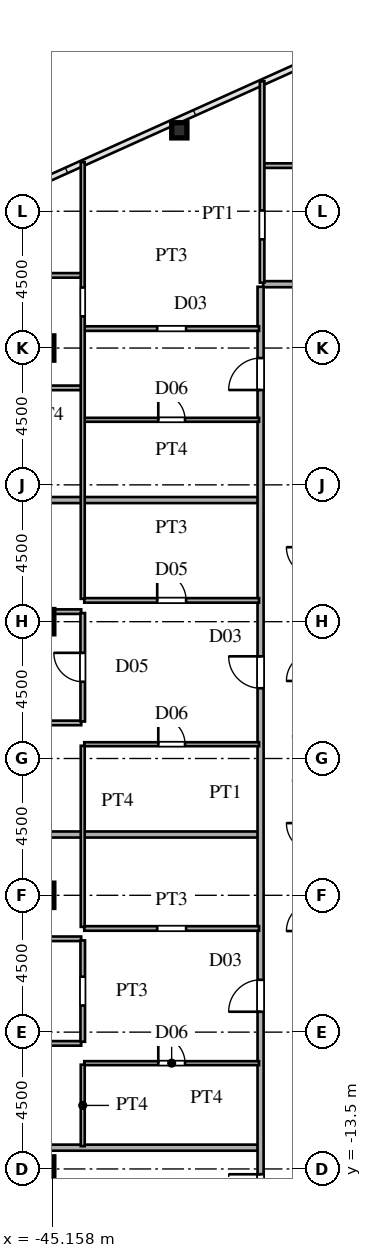
"""IFC4 building model, lengths in metres.
Left out: names, types, materials, properties, quantities, classifications, styles, units other than length and angle.
Written with IfcOpenShell. Run it as: python <this file> out.ifc"""

import sys

from ifc_helpers import new_model, si_unit, direction, frame, frame_2d, origin, origin_2d, place, context, subcontext, project, spatial, rectangle, hollow_rectangle, i_section, extrude, source, transform, mapped, element, fill, save


model = new_model("IFC4")
c1 = context("Model", 3, precision=1e-05, world=origin(), true_north=direction((0.0, 1.0)))
c2 = subcontext(c1, "Body", "Model", "MODEL_VIEW")
j1 = project(units=[si_unit("LENGTHUNIT", "METRE"), si_unit("PLANEANGLEUNIT", "RADIAN")], contexts=[c1])
p1 = place(None, origin())
s1 = spatial("IfcSite", under=j1, at=p1, CompositionType="ELEMENT")
p2 = place(p1, origin())
s2 = spatial("IfcBuilding", under=s1, at=p2, CompositionType="ELEMENT")
p3 = place(p2, frame((0.0, 0.0, 92.4)))
s3 = spatial("IfcBuildingStorey", under=s2, at=p3, CompositionType="ELEMENT", Elevation=92.4)
m1 = source(origin(), c2, "Body", "SweptSolid", [
    extrude(i_section(OverallWidth=0.8, OverallDepth=0.8, WebThickness=0.032, FlangeThickness=0.05, at=origin_2d()), origin(), (0.0, 0.0, 1.0), 3.6),
])
for number, where, z_axis, x_axis in (
    (1, (-45.5, -13.5, 0.0), (0.0, 0.0, 1.0), (1.0, 0.0, 0.0)),
    (2, (-45.5, -4.5, 0.0), (0.0, 0.0, 1.0), (1.0, 0.0, 0.0)),
    (3, (-45.5, 4.5, 0.0), (0.0, 0.0, 1.0), (1.0, 0.0, 0.0)),
    (4, (-45.5, 13.5, 0.0), (0.0, 0.0, 1.0), (1.0, 0.0, 0.0)),
):
    element("IfcColumn", number, at=place(p3, frame(where, z_axis=z_axis, x_axis=x_axis)), inside=s3, PredefinedType="COLUMN", context=c2, shape_type="MappedRepresentation", body=[
        mapped(m1, transform((0.0, 0.0, 0.0), scale=1.0)),
    ])
m2 = source(origin(), c2, "Body", "SweptSolid", [
    extrude(hollow_rectangle(XDim=0.5, YDim=0.5, WallThickness=0.02, at=origin_2d()), origin(), (0.0, 0.0, 1.0), 3.6),
])
p4 = place(p3, frame((-40.973, 20.661, 0.0), z_axis=(0.0, 0.0, 1.0), x_axis=(1.0, 0.0, 0.0)))
e5 = element("IfcColumn", 5, at=p4, inside=s3, PredefinedType="COLUMN", context=c2, shape_type="MappedRepresentation", body=[
    mapped(m2, transform((0.0, 0.0, 0.0), scale=1.0)),
])
p5 = place(p3, frame((-59.234, -12.8, 0.0), z_axis=(0.0, 0.0, 1.0), x_axis=(1.0, 0.0, 0.0)))
e6 = element("IfcWall", 6, at=p5, inside=s3, PredefinedType="PARTITIONING", context=c2, shape_type="SweptSolid", body=[
    extrude(rectangle(XDim=20.854, YDim=0.2, at=frame_2d((10.427, 0.0))), origin(), (0.0, 0.0, 1.0), 3.38),
])
p6 = place(p3, frame((-44.1, -10.02, 0.0), z_axis=(0.0, 0.0, 1.0), x_axis=(1.0, 0.0, 0.0)))
e7 = element("IfcWall", 7, at=p6, inside=s3, PredefinedType="PARTITIONING", context=c2, shape_type="SweptSolid", body=[
    extrude(rectangle(XDim=5.75, YDim=0.13, at=frame_2d((2.875, 0.0))), origin(), (0.0, 0.0, 1.0), 3.38),
])
p7 = place(p6, frame((2.435, 0.0, 0.0)))
e8 = element("IfcOpeningElement", 8, at=p7, cuts=e7, PredefinedType="OPENING", context=c2, shape_type="SweptSolid", body=[
    extrude(rectangle(XDim=0.88, YDim=2.1, at=frame_2d((0.44, 1.05))), frame((0.0, 0.075, 0.0), z_axis=(0.0, -1.0, 0.0), x_axis=(1.0, 0.0, 0.0)), (0.0, 0.0, 1.0), 0.15),
])
p8 = place(p3, frame((-66.887, -9.37, 0.0), z_axis=(0.0, 0.0, 1.0), x_axis=(1.0, 0.0, 0.0)))
e9 = element("IfcWall", 9, at=p8, inside=s3, PredefinedType="PARTITIONING", context=c2, shape_type="SweptSolid", body=[
    extrude(rectangle(XDim=22.687, YDim=0.15, at=frame_2d((11.344, 0.0))), origin(), (0.0, 0.0, 1.0), 3.38),
])
p9 = place(p8, frame((17.087, 0.0, 0.0)))
e10 = element("IfcOpeningElement", 10, at=p9, cuts=e9, PredefinedType="OPENING", context=c2, shape_type="SweptSolid", body=[
    extrude(rectangle(XDim=0.95, YDim=2.15, at=frame_2d((0.475, 1.075))), frame((0.0, 0.085, 0.0), z_axis=(0.0, -1.0, 0.0), x_axis=(1.0, 0.0, 0.0)), (0.0, 0.0, 1.0), 0.17),
])
p10 = place(p3, frame((-71.035, -5.93, 0.0), z_axis=(0.0, 0.0, 1.0), x_axis=(1.0, 0.0, 0.0)))
e11 = element("IfcWall", 11, at=p10, inside=s3, PredefinedType="PARTITIONING", context=c2, shape_type="SweptSolid", body=[
    extrude(rectangle(XDim=26.835, YDim=0.15, at=frame_2d((13.417, 0.0))), origin(), (0.0, 0.0, 1.0), 3.38),
])
p11 = place(p10, frame((21.235, 0.0, 0.0)))
e12 = element("IfcOpeningElement", 12, at=p11, cuts=e11, PredefinedType="OPENING", context=c2, shape_type="SweptSolid", body=[
    extrude(rectangle(XDim=0.95, YDim=2.15, at=frame_2d((0.475, 1.075))), frame((0.0, 0.085, 0.0), z_axis=(0.0, -1.0, 0.0), x_axis=(1.0, 0.0, 0.0)), (0.0, 0.0, 1.0), 0.17),
])
p12 = place(p3, frame((-44.1, -5.59, 0.0), z_axis=(0.0, 0.0, 1.0), x_axis=(1.0, 0.0, 0.0)))
e13 = element("IfcWall", 13, at=p12, inside=s3, PredefinedType="PARTITIONING", context=c2, shape_type="SweptSolid", body=[
    extrude(rectangle(XDim=5.75, YDim=0.15, at=frame_2d((2.875, 0.0))), origin(), (0.0, 0.0, 1.0), 3.38),
])
p13 = place(p12, frame((2.4, 0.0, 0.0)))
e14 = element("IfcOpeningElement", 14, at=p13, cuts=e13, PredefinedType="OPENING", context=c2, shape_type="SweptSolid", body=[
    extrude(rectangle(XDim=0.95, YDim=2.15, at=frame_2d((0.475, 1.075))), frame((0.0, 0.085, 0.0), z_axis=(0.0, -1.0, 0.0), x_axis=(1.0, 0.0, 0.0)), (0.0, 0.0, 1.0), 0.17),
])
p14 = place(p3, frame((-71.005, -2.5, 0.0), z_axis=(0.0, 0.0, 1.0), x_axis=(1.0, 0.0, 0.0)))
e15 = element("IfcWall", 15, at=p14, inside=s3, PredefinedType="PARTITIONING", context=c2, shape_type="SweptSolid", body=[
    extrude(rectangle(XDim=32.625, YDim=0.2, at=frame_2d((16.312, 0.0))), origin(), (0.0, 0.0, 1.0), 3.38),
])
p15 = place(p3, frame((-44.1, 0.47, 0.0), z_axis=(0.0, 0.0, 1.0), x_axis=(1.0, 0.0, 0.0)))
e16 = element("IfcWall", 16, at=p15, inside=s3, PredefinedType="PARTITIONING", context=c2, shape_type="SweptSolid", body=[
    extrude(rectangle(XDim=5.75, YDim=0.13, at=frame_2d((2.875, 0.0))), origin(), (0.0, 0.0, 1.0), 3.38),
])
p16 = place(p15, frame((2.435, 0.0, 0.0)))
e17 = element("IfcOpeningElement", 17, at=p16, cuts=e16, PredefinedType="OPENING", context=c2, shape_type="SweptSolid", body=[
    extrude(rectangle(XDim=0.88, YDim=2.1, at=frame_2d((0.44, 1.05))), frame((0.0, 0.075, 0.0), z_axis=(0.0, -1.0, 0.0), x_axis=(1.0, 0.0, 0.0)), (0.0, 0.0, 1.0), 0.15),
])
p17 = place(p3, frame((-71.035, 1.17, 0.0), z_axis=(0.0, 0.0, 1.0), x_axis=(1.0, 0.0, 0.0)))
e18 = element("IfcWall", 18, at=p17, inside=s3, PredefinedType="PARTITIONING", context=c2, shape_type="SweptSolid", body=[
    extrude(rectangle(XDim=26.835, YDim=0.15, at=frame_2d((13.417, 0.0))), origin(), (0.0, 0.0, 1.0), 3.38),
])
p18 = place(p17, frame((21.235, 0.0, 0.0)))
e19 = element("IfcOpeningElement", 19, at=p18, cuts=e18, PredefinedType="OPENING", context=c2, shape_type="SweptSolid", body=[
    extrude(rectangle(XDim=0.95, YDim=2.15, at=frame_2d((0.475, 1.075))), frame((0.0, 0.085, 0.0), z_axis=(0.0, -1.0, 0.0), x_axis=(1.0, 0.0, 0.0)), (0.0, 0.0, 1.0), 0.17),
])
p19 = place(p17, frame((13.21, 0.0, 0.0)))
e20 = element("IfcOpeningElement", 20, at=p19, cuts=e18, PredefinedType="OPENING", context=c2, shape_type="SweptSolid", body=[
    extrude(rectangle(XDim=0.95, YDim=2.15, at=frame_2d((0.475, 1.075))), frame((0.0, 0.085, 0.0), z_axis=(0.0, -1.0, 0.0), x_axis=(1.0, 0.0, 0.0)), (0.0, 0.0, 1.0), 0.17),
])
p20 = place(p3, frame((-71.035, 4.83, 0.0), z_axis=(0.0, 0.0, 1.0), x_axis=(1.0, 0.0, 0.0)))
e21 = element("IfcWall", 21, at=p20, inside=s3, PredefinedType="PARTITIONING", context=c2, shape_type="SweptSolid", body=[
    extrude(rectangle(XDim=26.835, YDim=0.15, at=frame_2d((13.417, 0.0))), origin(), (0.0, 0.0, 1.0), 3.38),
])
p21 = place(p20, frame((21.235, 0.0, 0.0)))
e22 = element("IfcOpeningElement", 22, at=p21, cuts=e21, PredefinedType="OPENING", context=c2, shape_type="SweptSolid", body=[
    extrude(rectangle(XDim=0.95, YDim=2.15, at=frame_2d((0.475, 1.075))), frame((0.0, 0.085, 0.0), z_axis=(0.0, -1.0, 0.0), x_axis=(1.0, 0.0, 0.0)), (0.0, 0.0, 1.0), 0.17),
])
p22 = place(p20, frame((13.21, 0.0, 0.0)))
e23 = element("IfcOpeningElement", 23, at=p22, cuts=e21, PredefinedType="OPENING", context=c2, shape_type="SweptSolid", body=[
    extrude(rectangle(XDim=0.95, YDim=2.15, at=frame_2d((0.475, 1.075))), frame((0.0, 0.085, 0.0), z_axis=(0.0, -1.0, 0.0), x_axis=(1.0, 0.0, 0.0)), (0.0, 0.0, 1.0), 0.17),
])
p23 = place(p3, frame((-44.1, 5.2, 0.0), z_axis=(0.0, 0.0, 1.0), x_axis=(1.0, 0.0, 0.0)))
e24 = element("IfcWall", 24, at=p23, inside=s3, PredefinedType="PARTITIONING", context=c2, shape_type="SweptSolid", body=[
    extrude(rectangle(XDim=5.75, YDim=0.15, at=frame_2d((2.875, 0.0))), origin(), (0.0, 0.0, 1.0), 3.38),
])
p24 = place(p23, frame((2.4, 0.0, 0.0)))
e25 = element("IfcOpeningElement", 25, at=p24, cuts=e24, PredefinedType="OPENING", context=c2, shape_type="SweptSolid", body=[
    extrude(rectangle(XDim=0.95, YDim=2.15, at=frame_2d((0.475, 1.075))), frame((0.0, 0.085, 0.0), z_axis=(0.0, -1.0, 0.0), x_axis=(1.0, 0.0, 0.0)), (0.0, 0.0, 1.0), 0.17),
])
p25 = place(p3, frame((-68.79, 8.5, 0.0), z_axis=(0.0, 0.0, 1.0), x_axis=(1.0, 0.0, 0.0)))
e26 = element("IfcWall", 26, at=p25, inside=s3, PredefinedType="PARTITIONING", context=c2, shape_type="SweptSolid", body=[
    extrude(rectangle(XDim=30.41, YDim=0.2, at=frame_2d((15.205, 0.0))), origin(), (0.0, 0.0, 1.0), 3.38),
])
p26 = place(p3, frame((-44.1, 11.14, 0.0), z_axis=(0.0, 0.0, 1.0), x_axis=(1.0, 0.0, 0.0)))
e27 = element("IfcWall", 27, at=p26, inside=s3, PredefinedType="PARTITIONING", context=c2, shape_type="SweptSolid", body=[
    extrude(rectangle(XDim=5.75, YDim=0.13, at=frame_2d((2.875, 0.0))), origin(), (0.0, 0.0, 1.0), 3.38),
])
p27 = place(p26, frame((2.435, 0.0, 0.0)))
e28 = element("IfcOpeningElement", 28, at=p27, cuts=e27, PredefinedType="OPENING", context=c2, shape_type="SweptSolid", body=[
    extrude(rectangle(XDim=0.88, YDim=2.1, at=frame_2d((0.44, 1.05))), frame((0.0, 0.075, 0.0), z_axis=(0.0, -1.0, 0.0), x_axis=(1.0, 0.0, 0.0)), (0.0, 0.0, 1.0), 0.15),
])
p28 = place(p3, frame((-60.603, 12.19, 0.0), z_axis=(0.0, 0.0, 1.0), x_axis=(1.0, 0.0, 0.0)))
e29 = element("IfcWall", 29, at=p28, inside=s3, PredefinedType="PARTITIONING", context=c2, shape_type="SweptSolid", body=[
    extrude(rectangle(XDim=16.403, YDim=0.15, at=frame_2d((8.202, 0.0))), origin(), (0.0, 0.0, 1.0), 3.38),
])
p29 = place(p28, frame((10.803, 0.0, 0.0)))
e30 = element("IfcOpeningElement", 30, at=p29, cuts=e29, PredefinedType="OPENING", context=c2, shape_type="SweptSolid", body=[
    extrude(rectangle(XDim=0.95, YDim=2.15, at=frame_2d((0.475, 1.075))), frame((0.0, 0.085, 0.0), z_axis=(0.0, -1.0, 0.0), x_axis=(1.0, 0.0, 0.0)), (0.0, 0.0, 1.0), 0.17),
])
p30 = place(p28, frame((2.594, 0.0, 0.0)))
e31 = element("IfcOpeningElement", 31, at=p30, cuts=e29, PredefinedType="OPENING", context=c2, shape_type="SweptSolid", body=[
    extrude(rectangle(XDim=0.95, YDim=2.15, at=frame_2d((0.475, 1.075))), frame((0.0, 0.085, 0.0), z_axis=(0.0, -1.0, 0.0), x_axis=(1.0, 0.0, 0.0)), (0.0, 0.0, 1.0), 0.17),
])
p31 = place(p3, frame((-44.1, 14.14, 0.0), z_axis=(0.0, 0.0, 1.0), x_axis=(1.0, 0.0, 0.0)))
e32 = element("IfcWall", 32, at=p31, inside=s3, PredefinedType="PARTITIONING", context=c2, shape_type="SweptSolid", body=[
    extrude(rectangle(XDim=5.75, YDim=0.15, at=frame_2d((2.875, 0.0))), origin(), (0.0, 0.0, 1.0), 3.38),
])
p32 = place(p31, frame((2.4, 0.0, 0.0)))
e33 = element("IfcOpeningElement", 33, at=p32, cuts=e32, PredefinedType="OPENING", context=c2, shape_type="SweptSolid", body=[
    extrude(rectangle(XDim=0.95, YDim=2.15, at=frame_2d((0.475, 1.075))), frame((0.0, 0.085, 0.0), z_axis=(0.0, -1.0, 0.0), x_axis=(1.0, 0.0, 0.0)), (0.0, 0.0, 1.0), 0.17),
])
p33 = place(p3, frame((-38.215, 15.6, 0.0), z_axis=(0.0, 0.0, 1.0), x_axis=(1.0, 0.0, 0.0)))
e34 = element("IfcWall", 34, at=p33, inside=s3, PredefinedType="PARTITIONING", context=c2, shape_type="SweptSolid", body=[
    extrude(rectangle(XDim=1.63, YDim=0.2, at=frame_2d((0.815, 0.0))), origin(), (0.0, 0.0, 1.0), 3.38),
])
p34 = place(p3, frame((-52.394, 15.89, 0.0), z_axis=(0.0, 0.0, 1.0), x_axis=(1.0, 0.0, 0.0)))
e35 = element("IfcWall", 35, at=p34, inside=s3, PredefinedType="PARTITIONING", context=c2, shape_type="SweptSolid", body=[
    extrude(rectangle(XDim=8.194, YDim=0.15, at=frame_2d((4.097, 0.0))), origin(), (0.0, 0.0, 1.0), 3.38),
])
p35 = place(p34, frame((3.664, 0.0, 0.0)))
e36 = element("IfcOpeningElement", 36, at=p35, cuts=e35, PredefinedType="OPENING", context=c2, shape_type="SweptSolid", body=[
    extrude(rectangle(XDim=0.95, YDim=2.15, at=frame_2d((0.475, 1.075))), frame((0.0, 0.085, 0.0), z_axis=(0.0, -1.0, 0.0), x_axis=(1.0, 0.0, 0.0)), (0.0, 0.0, 1.0), 0.17),
])
p36 = place(p3, frame((-38.2, 19.5, 0.0), z_axis=(0.0, 0.0, 1.0), x_axis=(1.0, 0.0, 0.0)))
e37 = element("IfcWall", 37, at=p36, inside=s3, PredefinedType="PARTITIONING", context=c2, shape_type="SweptSolid", body=[
    extrude(rectangle(XDim=10.735, YDim=0.15, at=frame_2d((5.367, 0.0))), origin(), (0.0, 0.0, 1.0), 3.38),
])
p37 = place(p36, frame((4.85, 0.0, 0.0)))
e38 = element("IfcOpeningElement", 38, at=p37, cuts=e37, PredefinedType="OPENING", context=c2, shape_type="SweptSolid", body=[
    extrude(rectangle(XDim=0.95, YDim=2.15, at=frame_2d((0.475, 1.075))), frame((0.0, 0.085, 0.0), z_axis=(0.0, -1.0, 0.0), x_axis=(1.0, 0.0, 0.0)), (0.0, 0.0, 1.0), 0.17),
])
p38 = place(p3, frame((-44.15, -12.75, 0.0), z_axis=(0.0, 0.0, 1.0), x_axis=(0.0, 1.0, 0.0)))
e39 = element("IfcWall", 39, at=p38, inside=s3, PredefinedType="PARTITIONING", context=c2, shape_type="SweptSolid", body=[
    extrude(rectangle(XDim=2.679, YDim=0.13, at=frame_2d((1.339, 0.0))), origin(), (0.0, 0.0, 1.0), 3.38),
])
p39 = place(p3, frame((-44.15, -9.317, 0.0), z_axis=(0.0, 0.0, 1.0), x_axis=(0.0, 1.0, 0.0)))
e40 = element("IfcWall", 40, at=p39, inside=s3, PredefinedType="PARTITIONING", context=c2, shape_type="SweptSolid", body=[
    extrude(rectangle(XDim=3.334, YDim=0.15, at=frame_2d((1.667, 0.0))), origin(), (0.0, 0.0, 1.0), 3.38),
])
p40 = place(p39, frame((1.192, 0.0, 0.0)))
e41 = element("IfcOpeningElement", 41, at=p40, cuts=e40, PredefinedType="OPENING", context=c2, shape_type="SweptSolid", body=[
    extrude(rectangle(XDim=0.95, YDim=2.15, at=frame_2d((0.475, 1.075))), frame((0.0, 0.085, 0.0), z_axis=(0.0, -1.0, 0.0), x_axis=(1.0, 0.0, 0.0)), (0.0, 0.0, 1.0), 0.17),
])
p41 = place(p3, frame((-44.15, -5.538, 0.0), z_axis=(0.0, 0.0, 1.0), x_axis=(0.0, 1.0, 0.0)))
e42 = element("IfcWall", 42, at=p41, inside=s3, PredefinedType="PARTITIONING", context=c2, shape_type="SweptSolid", body=[
    extrude(rectangle(XDim=5.956, YDim=0.13, at=frame_2d((2.978, 0.0))), origin(), (0.0, 0.0, 1.0), 3.38),
])
p42 = place(p3, frame((-44.15, 1.217, 0.0), z_axis=(0.0, 0.0, 1.0), x_axis=(0.0, 1.0, 0.0)))
e43 = element("IfcWall", 43, at=p42, inside=s3, PredefinedType="PARTITIONING", context=c2, shape_type="SweptSolid", body=[
    extrude(rectangle(XDim=3.566, YDim=0.15, at=frame_2d((1.783, 0.0))), origin(), (0.0, 0.0, 1.0), 3.38),
])
p43 = place(p42, frame((1.308, 0.0, 0.0)))
e44 = element("IfcOpeningElement", 44, at=p43, cuts=e43, PredefinedType="OPENING", context=c2, shape_type="SweptSolid", body=[
    extrude(rectangle(XDim=0.95, YDim=2.15, at=frame_2d((0.475, 1.075))), frame((0.0, 0.085, 0.0), z_axis=(0.0, -1.0, 0.0), x_axis=(1.0, 0.0, 0.0)), (0.0, 0.0, 1.0), 0.17),
])
p44 = place(p3, frame((-44.15, 5.252, 0.0), z_axis=(0.0, 0.0, 1.0), x_axis=(0.0, 1.0, 0.0)))
e45 = element("IfcWall", 45, at=p44, inside=s3, PredefinedType="PARTITIONING", context=c2, shape_type="SweptSolid", body=[
    extrude(rectangle(XDim=14.365, YDim=0.13, at=frame_2d((7.183, 0.0))), origin(), (0.0, 0.0, 1.0), 3.38),
])
p45 = place(p44, frame((9.29, 0.0, 0.0)))
e46 = element("IfcOpeningElement", 46, at=p45, cuts=e45, PredefinedType="OPENING", context=c2, shape_type="SweptSolid", body=[
    extrude(rectangle(XDim=0.95, YDim=2.15, at=frame_2d((0.475, 1.075))), frame((0.0, 0.075, 0.0), z_axis=(0.0, -1.0, 0.0), x_axis=(1.0, 0.0, 0.0)), (0.0, 0.0, 1.0), 0.15),
])
p46 = place(p3, frame((-38.3, -15.515, 0.0), z_axis=(0.0, 0.0, 1.0), x_axis=(0.0, 1.0, 0.0)))
e47 = element("IfcWall", 47, at=p46, inside=s3, PredefinedType="PARTITIONING", context=c2, shape_type="SweptSolid", body=[
    extrude(rectangle(XDim=31.03, YDim=0.2, at=frame_2d((15.515, 0.0))), origin(), (0.0, 0.0, 1.0), 3.38),
])
p47 = place(p46, frame((0.79, 0.0, 0.0)))
e48 = element("IfcOpeningElement", 48, at=p47, cuts=e47, PredefinedType="OPENING", context=c2, shape_type="SweptSolid", body=[
    extrude(rectangle(XDim=1.05, YDim=2.25, at=frame_2d((0.525, 1.125))), frame((0.0, 0.11, 0.0), z_axis=(0.0, -1.0, 0.0), x_axis=(1.0, 0.0, 0.0)), (0.0, 0.0, 1.0), 0.22),
])
p48 = place(p46, frame((7.186, 0.0, 0.0)))
e49 = element("IfcOpeningElement", 49, at=p48, cuts=e47, PredefinedType="OPENING", context=c2, shape_type="SweptSolid", body=[
    extrude(rectangle(XDim=1.05, YDim=2.25, at=frame_2d((0.525, 1.125))), frame((0.0, 0.11, 0.0), z_axis=(0.0, -1.0, 0.0), x_axis=(1.0, 0.0, 0.0)), (0.0, 0.0, 1.0), 0.22),
])
p49 = place(p46, frame((17.825, 0.0, 0.0)))
e50 = element("IfcOpeningElement", 50, at=p49, cuts=e47, PredefinedType="OPENING", context=c2, shape_type="SweptSolid", body=[
    extrude(rectangle(XDim=1.05, YDim=2.25, at=frame_2d((0.525, 1.125))), frame((0.0, 0.11, 0.0), z_axis=(0.0, -1.0, 0.0), x_axis=(1.0, 0.0, 0.0)), (0.0, 0.0, 1.0), 0.22),
])
p50 = place(p46, frame((27.635, 0.0, 0.0)))
e51 = element("IfcOpeningElement", 51, at=p50, cuts=e47, PredefinedType="OPENING", context=c2, shape_type="SweptSolid", body=[
    extrude(rectangle(XDim=1.05, YDim=2.25, at=frame_2d((0.525, 1.125))), frame((0.0, 0.11, 0.0), z_axis=(0.0, -1.0, 0.0), x_axis=(1.0, 0.0, 0.0)), (0.0, 0.0, 1.0), 0.22),
])
p51 = place(p3, frame((-38.25, 15.65, 0.0), z_axis=(0.0, 0.0, 1.0), x_axis=(0.0, 1.0, 0.0)))
e52 = element("IfcWall", 52, at=p51, inside=s3, PredefinedType="PARTITIONING", context=c2, shape_type="SweptSolid", body=[
    extrude(rectangle(XDim=6.623, YDim=0.15, at=frame_2d((3.312, 0.0))), origin(), (0.0, 0.0, 1.0), 3.38),
])
p52 = place(p51, frame((1.425, 0.0, 0.0)))
e53 = element("IfcOpeningElement", 53, at=p52, cuts=e52, PredefinedType="OPENING", context=c2, shape_type="SweptSolid", body=[
    extrude(rectangle(XDim=0.95, YDim=2.15, at=frame_2d((0.475, 1.075))), frame((0.0, 0.085, 0.0), z_axis=(0.0, -1.0, 0.0), x_axis=(1.0, 0.0, 0.0)), (0.0, 0.0, 1.0), 0.17),
])
m3 = source(origin(), c2, "Body", "SweptSolid", [
    extrude(rectangle(XDim=0.88, YDim=2.1, at=frame_2d((0.44, 1.05))), frame((0.0, 0.025, 0.0), z_axis=(0.0, -1.0, 0.0), x_axis=(1.0, 0.0, 0.0)), (0.0, 0.0, 1.0), 0.05),
])
p53 = place(p7, origin())
e54 = element("IfcDoor", 54, at=p53, inside=s3, OperationType="SINGLE_SWING_LEFT", PredefinedType="DOOR", context=c2, shape_type="MappedRepresentation", body=[
    mapped(m3, transform((0.0, 0.0, 0.0), scale=1.0)),
])
fill(e8, e54)
p54 = place(p16, origin())
e55 = element("IfcDoor", 55, at=p54, inside=s3, OperationType="SINGLE_SWING_LEFT", PredefinedType="DOOR", context=c2, shape_type="MappedRepresentation", body=[
    mapped(m3, transform((0.0, 0.0, 0.0), scale=1.0)),
])
fill(e17, e55)
m4 = source(origin(), c2, "Body", "SweptSolid", [
    extrude(rectangle(XDim=0.95, YDim=2.15, at=frame_2d((0.475, 1.075))), frame((0.0, 0.025, 0.0), z_axis=(0.0, -1.0, 0.0), x_axis=(1.0, 0.0, 0.0)), (0.0, 0.0, 1.0), 0.05),
])
p55 = place(p24, origin())
e56 = element("IfcDoor", 56, at=p55, inside=s3, OperationType="SINGLE_SWING_LEFT", PredefinedType="DOOR", context=c2, shape_type="MappedRepresentation", body=[
    mapped(m4, transform((0.0, 0.0, 0.0), scale=1.0)),
])
fill(e25, e56)
p56 = place(p27, origin())
e57 = element("IfcDoor", 57, at=p56, inside=s3, OperationType="SINGLE_SWING_LEFT", PredefinedType="DOOR", context=c2, shape_type="MappedRepresentation", body=[
    mapped(m3, transform((0.0, 0.0, 0.0), scale=1.0)),
])
fill(e28, e57)
p57 = place(p43, origin())
e58 = element("IfcDoor", 58, at=p57, inside=s3, OperationType="SINGLE_SWING_RIGHT", PredefinedType="DOOR", context=c2, shape_type="MappedRepresentation", body=[
    mapped(m4, transform((0.0, 0.0, 0.0), scale=1.0)),
])
fill(e44, e58)
m5 = source(origin(), c2, "Body", "SweptSolid", [
    extrude(rectangle(XDim=1.05, YDim=2.25, at=frame_2d((0.525, 1.125))), frame((0.0, 0.025, 0.0), z_axis=(0.0, -1.0, 0.0), x_axis=(1.0, 0.0, 0.0)), (0.0, 0.0, 1.0), 0.05),
])
p58 = place(p47, origin())
e59 = element("IfcDoor", 59, at=p58, inside=s3, OperationType="SINGLE_SWING_RIGHT", PredefinedType="DOOR", context=c2, shape_type="MappedRepresentation", body=[
    mapped(m5, transform((0.0, 0.0, 0.0), scale=1.0)),
])
fill(e48, e59)
p59 = place(p48, origin())
e60 = element("IfcDoor", 60, at=p59, inside=s3, OperationType="SINGLE_SWING_LEFT", PredefinedType="DOOR", context=c2, shape_type="MappedRepresentation", body=[
    mapped(m5, transform((0.0, 0.0, 0.0), scale=1.0)),
])
fill(e49, e60)
p60 = place(p49, origin())
e61 = element("IfcDoor", 61, at=p60, inside=s3, OperationType="SINGLE_SWING_RIGHT", PredefinedType="DOOR", context=c2, shape_type="MappedRepresentation", body=[
    mapped(m5, transform((0.0, 0.0, 0.0), scale=1.0)),
])
fill(e50, e61)
p61 = place(p50, origin())
e62 = element("IfcDoor", 62, at=p61, inside=s3, OperationType="SINGLE_SWING_LEFT", PredefinedType="DOOR", context=c2, shape_type="MappedRepresentation", body=[
    mapped(m5, transform((0.0, 0.0, 0.0), scale=1.0)),
])
fill(e51, e62)
save(model, sys.argv[1])
